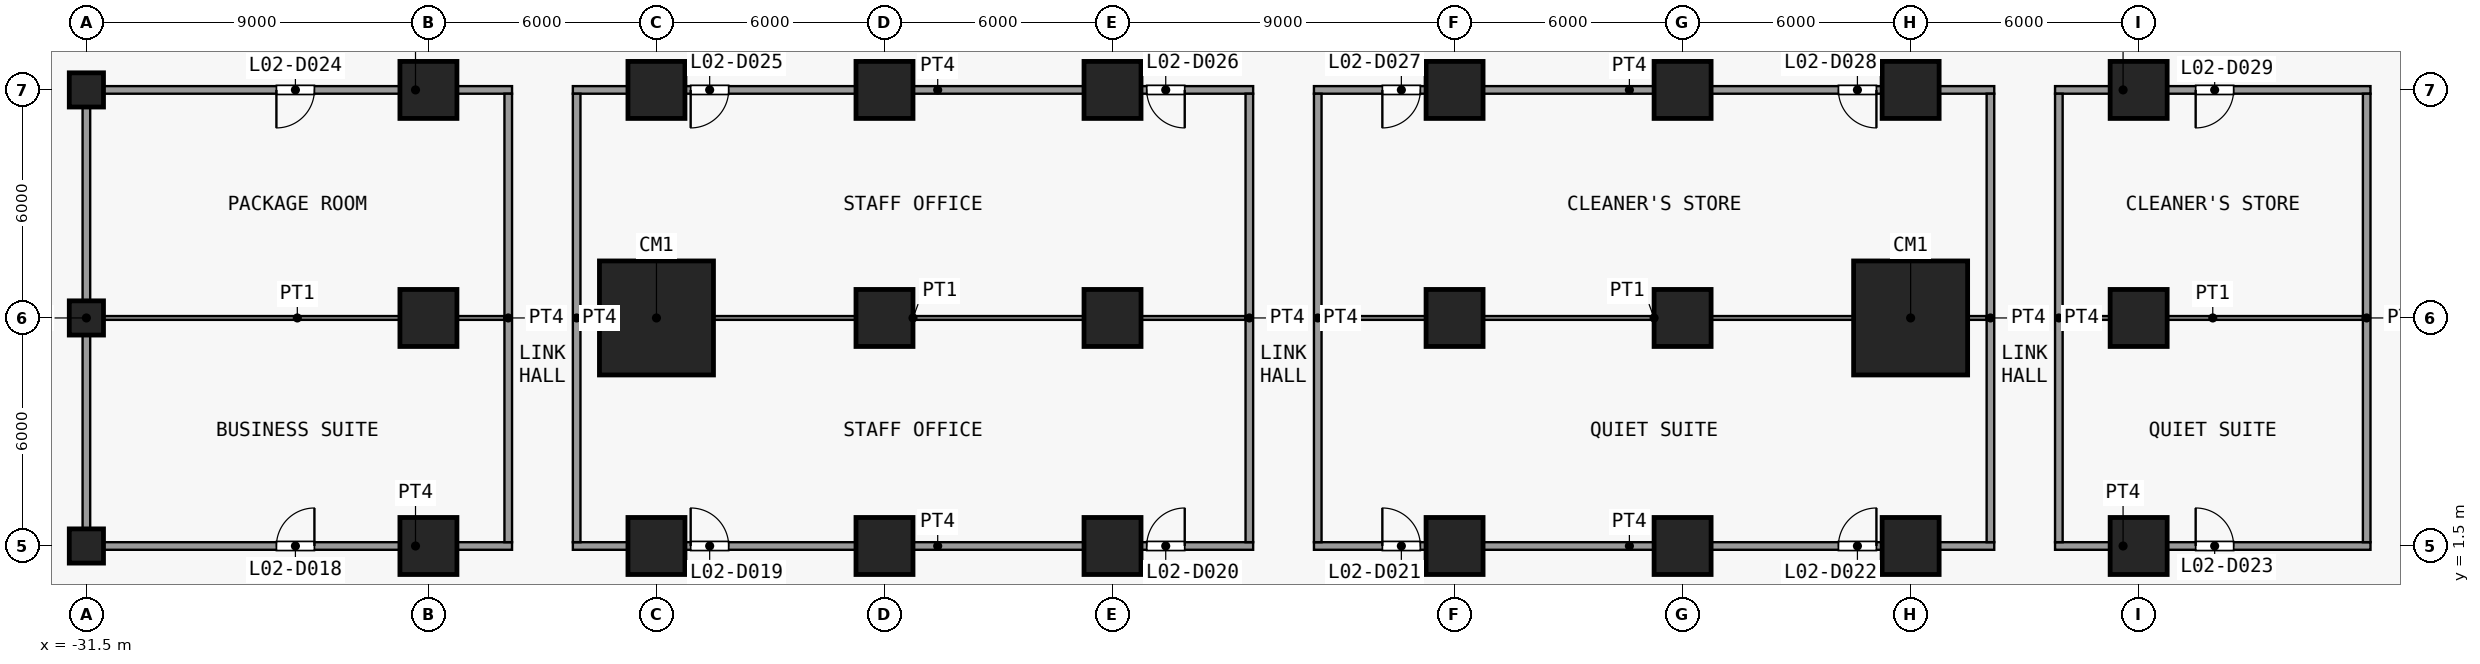
"""IFC4 building model, lengths in metres.
Left out: names, types, materials, properties, quantities, classifications, styles, units other than length and angle.
Written with IfcOpenShell. Run it as: python <this file> out.ifc"""

import sys

from ifc_helpers import new_model, si_unit, direction, frame, frame_2d, origin, origin_2d, place, context, subcontext, project, spatial, rectangle, extrude, element, fill, save


model = new_model("IFC4")
c1 = context("Model", 3, precision=1e-05, world=origin(), true_north=direction((0.0, 1.0)))
c2 = subcontext(c1, "Body", "Model", "MODEL_VIEW")
j1 = project(units=[si_unit("LENGTHUNIT", "METRE"), si_unit("PLANEANGLEUNIT", "RADIAN")], contexts=[c1])
p1 = place(None, origin())
s1 = spatial("IfcSite", under=j1, at=p1, CompositionType="ELEMENT")
p2 = place(p1, origin())
s2 = spatial("IfcBuilding", under=s1, at=p2, CompositionType="ELEMENT")
p3 = place(p2, frame((0.0, 0.0, 13.5)))
s3 = spatial("IfcBuildingStorey", under=s2, at=p3, CompositionType="ELEMENT", Elevation=13.5)
for number, where, z_axis, x_axis in (
    (1, (-31.5, 1.5, 0.0), (0.0, 0.0, 1.0), (1.0, 0.0, 0.0)),
    (2, (-31.5, 7.5, 0.0), (0.0, 0.0, 1.0), (1.0, 0.0, 0.0)),
    (3, (-31.5, 13.5, 0.0), (0.0, 0.0, 1.0), (1.0, 0.0, 0.0)),
):
    element("IfcColumn", number, at=place(p3, frame(where, z_axis=z_axis, x_axis=x_axis)), inside=s3, PredefinedType="COLUMN", context=c2, shape_type="SweptSolid", body=[
        extrude(rectangle(XDim=0.9, YDim=0.9, at=origin_2d()), origin(), (0.0, 0.0, 1.0), 5.0),
    ])
for number, where, z_axis, x_axis in (
    (4, (-22.5, 1.5, 0.0), (0.0, 0.0, 1.0), (1.0, 0.0, 0.0)),
    (5, (-22.5, 7.5, 0.0), (0.0, 0.0, 1.0), (1.0, 0.0, 0.0)),
    (6, (-22.5, 13.5, 0.0), (0.0, 0.0, 1.0), (1.0, 0.0, 0.0)),
    (7, (-16.5, 1.5, 0.0), (0.0, 0.0, 1.0), (1.0, 0.0, 0.0)),
):
    element("IfcColumn", number, at=place(p3, frame(where, z_axis=z_axis, x_axis=x_axis)), inside=s3, PredefinedType="COLUMN", context=c2, shape_type="SweptSolid", body=[
        extrude(rectangle(XDim=1.5, YDim=1.5, at=origin_2d()), origin(), (0.0, 0.0, 1.0), 5.0),
    ])
p4 = place(p3, frame((-16.5, 7.5, 0.0), z_axis=(0.0, 0.0, 1.0), x_axis=(1.0, 0.0, 0.0)))
e8 = element("IfcColumn", 8, at=p4, inside=s3, PredefinedType="COLUMN", context=c2, shape_type="SweptSolid", body=[
    extrude(rectangle(XDim=3.0, YDim=3.0, at=origin_2d()), origin(), (0.0, 0.0, 1.0), 5.0),
])
for number, where, z_axis, x_axis in (
    (9, (-16.5, 13.5, 0.0), (0.0, 0.0, 1.0), (1.0, 0.0, 0.0)),
    (10, (-10.5, 1.5, 0.0), (0.0, 0.0, 1.0), (1.0, 0.0, 0.0)),
    (11, (-10.5, 7.5, 0.0), (0.0, 0.0, 1.0), (1.0, 0.0, 0.0)),
    (12, (-10.5, 13.5, 0.0), (0.0, 0.0, 1.0), (1.0, 0.0, 0.0)),
    (13, (-4.5, 1.5, 0.0), (0.0, 0.0, 1.0), (1.0, 0.0, 0.0)),
    (14, (-4.5, 7.5, 0.0), (0.0, 0.0, 1.0), (1.0, 0.0, 0.0)),
    (15, (-4.5, 13.5, 0.0), (0.0, 0.0, 1.0), (1.0, 0.0, 0.0)),
    (16, (4.5, 1.5, 0.0), (0.0, 0.0, 1.0), (1.0, 0.0, 0.0)),
    (17, (4.5, 7.5, 0.0), (0.0, 0.0, 1.0), (1.0, 0.0, 0.0)),
    (18, (4.5, 13.5, 0.0), (0.0, 0.0, 1.0), (1.0, 0.0, 0.0)),
    (19, (10.5, 1.5, 0.0), (0.0, 0.0, 1.0), (1.0, 0.0, 0.0)),
    (20, (10.5, 7.5, 0.0), (0.0, 0.0, 1.0), (1.0, 0.0, 0.0)),
    (21, (10.5, 13.5, 0.0), (0.0, 0.0, 1.0), (1.0, 0.0, 0.0)),
    (22, (16.5, 1.5, 0.0), (0.0, 0.0, 1.0), (1.0, 0.0, 0.0)),
):
    element("IfcColumn", number, at=place(p3, frame(where, z_axis=z_axis, x_axis=x_axis)), inside=s3, PredefinedType="COLUMN", context=c2, shape_type="SweptSolid", body=[
        extrude(rectangle(XDim=1.5, YDim=1.5, at=origin_2d()), origin(), (0.0, 0.0, 1.0), 5.0),
    ])
p5 = place(p3, frame((16.5, 7.5, 0.0), z_axis=(0.0, 0.0, 1.0), x_axis=(1.0, 0.0, 0.0)))
e23 = element("IfcColumn", 23, at=p5, inside=s3, PredefinedType="COLUMN", context=c2, shape_type="SweptSolid", body=[
    extrude(rectangle(XDim=3.0, YDim=3.0, at=origin_2d()), origin(), (0.0, 0.0, 1.0), 5.0),
])
for number, where, z_axis, x_axis in (
    (24, (16.5, 13.5, 0.0), (0.0, 0.0, 1.0), (1.0, 0.0, 0.0)),
    (25, (22.5, 1.5, 0.0), (0.0, 0.0, 1.0), (1.0, 0.0, 0.0)),
    (26, (22.5, 7.5, 0.0), (0.0, 0.0, 1.0), (1.0, 0.0, 0.0)),
    (27, (22.5, 13.5, 0.0), (0.0, 0.0, 1.0), (1.0, 0.0, 0.0)),
):
    element("IfcColumn", number, at=place(p3, frame(where, z_axis=z_axis, x_axis=x_axis)), inside=s3, PredefinedType="COLUMN", context=c2, shape_type="SweptSolid", body=[
        extrude(rectangle(XDim=1.5, YDim=1.5, at=origin_2d()), origin(), (0.0, 0.0, 1.0), 5.0),
    ])
p6 = place(p3, frame((-31.6, 1.5, 0.0), z_axis=(0.0, 0.0, 1.0), x_axis=(1.0, 0.0, 0.0)))
e28 = element("IfcWall", 28, at=p6, inside=s3, PredefinedType="PARTITIONING", context=c2, shape_type="SweptSolid", body=[
    extrude(rectangle(XDim=11.3, YDim=0.2, at=frame_2d((5.65, 0.0))), origin(), (0.0, 0.0, 1.0), 4.65),
])
p7 = place(p6, frame((5.1, 0.0, 0.0)))
e29 = element("IfcOpeningElement", 29, at=p7, cuts=e28, PredefinedType="OPENING", context=c2, shape_type="SweptSolid", body=[
    extrude(rectangle(XDim=1.0, YDim=2.1, at=frame_2d((0.5, 1.05))), frame((0.0, 0.11, 0.0), z_axis=(0.0, -1.0, 0.0), x_axis=(1.0, 0.0, 0.0)), (0.0, 0.0, 1.0), 0.22),
])
p8 = place(p3, frame((-18.7, 1.5, 0.0), z_axis=(0.0, 0.0, 1.0), x_axis=(1.0, 0.0, 0.0)))
e30 = element("IfcWall", 30, at=p8, inside=s3, PredefinedType="PARTITIONING", context=c2, shape_type="SweptSolid", body=[
    extrude(rectangle(XDim=17.9, YDim=0.2, at=frame_2d((8.95, 0.0))), origin(), (0.0, 0.0, 1.0), 4.65),
])
p9 = place(p8, frame((3.1, 0.0, 0.0)))
e31 = element("IfcOpeningElement", 31, at=p9, cuts=e30, PredefinedType="OPENING", context=c2, shape_type="SweptSolid", body=[
    extrude(rectangle(XDim=1.0, YDim=2.1, at=frame_2d((0.5, 1.05))), frame((0.0, 0.11, 0.0), z_axis=(0.0, -1.0, 0.0), x_axis=(1.0, 0.0, 0.0)), (0.0, 0.0, 1.0), 0.22),
])
p10 = place(p8, frame((15.1, 0.0, 0.0)))
e32 = element("IfcOpeningElement", 32, at=p10, cuts=e30, PredefinedType="OPENING", context=c2, shape_type="SweptSolid", body=[
    extrude(rectangle(XDim=1.0, YDim=2.1, at=frame_2d((0.5, 1.05))), frame((0.0, 0.11, 0.0), z_axis=(0.0, -1.0, 0.0), x_axis=(1.0, 0.0, 0.0)), (0.0, 0.0, 1.0), 0.22),
])
p11 = place(p3, frame((0.8, 1.5, 0.0), z_axis=(0.0, 0.0, 1.0), x_axis=(1.0, 0.0, 0.0)))
e33 = element("IfcWall", 33, at=p11, inside=s3, PredefinedType="PARTITIONING", context=c2, shape_type="SweptSolid", body=[
    extrude(rectangle(XDim=17.9, YDim=0.2, at=frame_2d((8.95, 0.0))), origin(), (0.0, 0.0, 1.0), 4.65),
])
p12 = place(p11, frame((1.8, 0.0, 0.0)))
e34 = element("IfcOpeningElement", 34, at=p12, cuts=e33, PredefinedType="OPENING", context=c2, shape_type="SweptSolid", body=[
    extrude(rectangle(XDim=1.0, YDim=2.1, at=frame_2d((0.5, 1.05))), frame((0.0, 0.11, 0.0), z_axis=(0.0, -1.0, 0.0), x_axis=(1.0, 0.0, 0.0)), (0.0, 0.0, 1.0), 0.22),
])
p13 = place(p11, frame((13.8, 0.0, 0.0)))
e35 = element("IfcOpeningElement", 35, at=p13, cuts=e33, PredefinedType="OPENING", context=c2, shape_type="SweptSolid", body=[
    extrude(rectangle(XDim=1.0, YDim=2.1, at=frame_2d((0.5, 1.05))), frame((0.0, 0.11, 0.0), z_axis=(0.0, -1.0, 0.0), x_axis=(1.0, 0.0, 0.0)), (0.0, 0.0, 1.0), 0.22),
])
p14 = place(p3, frame((20.3, 1.5, 0.0), z_axis=(0.0, 0.0, 1.0), x_axis=(1.0, 0.0, 0.0)))
e36 = element("IfcWall", 36, at=p14, inside=s3, PredefinedType="PARTITIONING", context=c2, shape_type="SweptSolid", body=[
    extrude(rectangle(XDim=8.3, YDim=0.2, at=frame_2d((4.15, 0.0))), origin(), (0.0, 0.0, 1.0), 4.65),
])
p15 = place(p14, frame((3.7, 0.0, 0.0)))
e37 = element("IfcOpeningElement", 37, at=p15, cuts=e36, PredefinedType="OPENING", context=c2, shape_type="SweptSolid", body=[
    extrude(rectangle(XDim=1.0, YDim=2.1, at=frame_2d((0.5, 1.05))), frame((0.0, 0.11, 0.0), z_axis=(0.0, -1.0, 0.0), x_axis=(1.0, 0.0, 0.0)), (0.0, 0.0, 1.0), 0.22),
])
p16 = place(p3, frame((-31.4, 7.5, 0.0), z_axis=(0.0, 0.0, 1.0), x_axis=(1.0, 0.0, 0.0)))
e38 = element("IfcWall", 38, at=p16, inside=s3, PredefinedType="PARTITIONING", context=c2, shape_type="SweptSolid", body=[
    extrude(rectangle(XDim=10.9, YDim=0.1, at=frame_2d((5.45, 0.0))), origin(), (0.0, 0.0, 1.0), 4.65),
])
for number, where, z_axis, x_axis in (
    (39, (-18.5, 7.5, 0.0), (0.0, 0.0, 1.0), (1.0, 0.0, 0.0)),
    (40, (1.0, 7.5, 0.0), (0.0, 0.0, 1.0), (1.0, 0.0, 0.0)),
):
    element("IfcWall", number, at=place(p3, frame(where, z_axis=z_axis, x_axis=x_axis)), inside=s3, PredefinedType="PARTITIONING", context=c2, shape_type="SweptSolid", body=[
        extrude(rectangle(XDim=17.5, YDim=0.1, at=frame_2d((8.75, 0.0))), origin(), (0.0, 0.0, 1.0), 4.65),
    ])
p17 = place(p3, frame((20.5, 7.5, 0.0), z_axis=(0.0, 0.0, 1.0), x_axis=(1.0, 0.0, 0.0)))
e41 = element("IfcWall", 41, at=p17, inside=s3, PredefinedType="PARTITIONING", context=c2, shape_type="SweptSolid", body=[
    extrude(rectangle(XDim=7.9, YDim=0.1, at=frame_2d((3.95, 0.0))), origin(), (0.0, 0.0, 1.0), 4.65),
])
p18 = place(p3, frame((-31.6, 13.5, 0.0), z_axis=(0.0, 0.0, 1.0), x_axis=(1.0, 0.0, 0.0)))
e42 = element("IfcWall", 42, at=p18, inside=s3, PredefinedType="PARTITIONING", context=c2, shape_type="SweptSolid", body=[
    extrude(rectangle(XDim=11.3, YDim=0.2, at=frame_2d((5.65, 0.0))), origin(), (0.0, 0.0, 1.0), 4.65),
])
p19 = place(p18, frame((5.1, 0.0, 0.0)))
e43 = element("IfcOpeningElement", 43, at=p19, cuts=e42, PredefinedType="OPENING", context=c2, shape_type="SweptSolid", body=[
    extrude(rectangle(XDim=1.0, YDim=2.1, at=frame_2d((0.5, 1.05))), frame((0.0, 0.11, 0.0), z_axis=(0.0, -1.0, 0.0), x_axis=(1.0, 0.0, 0.0)), (0.0, 0.0, 1.0), 0.22),
])
p20 = place(p3, frame((-18.7, 13.5, 0.0), z_axis=(0.0, 0.0, 1.0), x_axis=(1.0, 0.0, 0.0)))
e44 = element("IfcWall", 44, at=p20, inside=s3, PredefinedType="PARTITIONING", context=c2, shape_type="SweptSolid", body=[
    extrude(rectangle(XDim=17.9, YDim=0.2, at=frame_2d((8.95, 0.0))), origin(), (0.0, 0.0, 1.0), 4.65),
])
p21 = place(p20, frame((3.1, 0.0, 0.0)))
e45 = element("IfcOpeningElement", 45, at=p21, cuts=e44, PredefinedType="OPENING", context=c2, shape_type="SweptSolid", body=[
    extrude(rectangle(XDim=1.0, YDim=2.1, at=frame_2d((0.5, 1.05))), frame((0.0, 0.11, 0.0), z_axis=(0.0, -1.0, 0.0), x_axis=(1.0, 0.0, 0.0)), (0.0, 0.0, 1.0), 0.22),
])
p22 = place(p20, frame((15.1, 0.0, 0.0)))
e46 = element("IfcOpeningElement", 46, at=p22, cuts=e44, PredefinedType="OPENING", context=c2, shape_type="SweptSolid", body=[
    extrude(rectangle(XDim=1.0, YDim=2.1, at=frame_2d((0.5, 1.05))), frame((0.0, 0.11, 0.0), z_axis=(0.0, -1.0, 0.0), x_axis=(1.0, 0.0, 0.0)), (0.0, 0.0, 1.0), 0.22),
])
p23 = place(p3, frame((0.8, 13.5, 0.0), z_axis=(0.0, 0.0, 1.0), x_axis=(1.0, 0.0, 0.0)))
e47 = element("IfcWall", 47, at=p23, inside=s3, PredefinedType="PARTITIONING", context=c2, shape_type="SweptSolid", body=[
    extrude(rectangle(XDim=17.9, YDim=0.2, at=frame_2d((8.95, 0.0))), origin(), (0.0, 0.0, 1.0), 4.65),
])
p24 = place(p23, frame((1.8, 0.0, 0.0)))
e48 = element("IfcOpeningElement", 48, at=p24, cuts=e47, PredefinedType="OPENING", context=c2, shape_type="SweptSolid", body=[
    extrude(rectangle(XDim=1.0, YDim=2.1, at=frame_2d((0.5, 1.05))), frame((0.0, 0.11, 0.0), z_axis=(0.0, -1.0, 0.0), x_axis=(1.0, 0.0, 0.0)), (0.0, 0.0, 1.0), 0.22),
])
p25 = place(p23, frame((13.8, 0.0, 0.0)))
e49 = element("IfcOpeningElement", 49, at=p25, cuts=e47, PredefinedType="OPENING", context=c2, shape_type="SweptSolid", body=[
    extrude(rectangle(XDim=1.0, YDim=2.1, at=frame_2d((0.5, 1.05))), frame((0.0, 0.11, 0.0), z_axis=(0.0, -1.0, 0.0), x_axis=(1.0, 0.0, 0.0)), (0.0, 0.0, 1.0), 0.22),
])
p26 = place(p3, frame((20.3, 13.5, 0.0), z_axis=(0.0, 0.0, 1.0), x_axis=(1.0, 0.0, 0.0)))
e50 = element("IfcWall", 50, at=p26, inside=s3, PredefinedType="PARTITIONING", context=c2, shape_type="SweptSolid", body=[
    extrude(rectangle(XDim=8.3, YDim=0.2, at=frame_2d((4.15, 0.0))), origin(), (0.0, 0.0, 1.0), 4.65),
])
p27 = place(p26, frame((3.7, 0.0, 0.0)))
e51 = element("IfcOpeningElement", 51, at=p27, cuts=e50, PredefinedType="OPENING", context=c2, shape_type="SweptSolid", body=[
    extrude(rectangle(XDim=1.0, YDim=2.1, at=frame_2d((0.5, 1.05))), frame((0.0, 0.11, 0.0), z_axis=(0.0, -1.0, 0.0), x_axis=(1.0, 0.0, 0.0)), (0.0, 0.0, 1.0), 0.22),
])
for number, where, z_axis, x_axis in (
    (52, (-31.5, 1.6, 0.0), (0.0, 0.0, 1.0), (0.0, 1.0, 0.0)),
    (53, (-20.4, 1.6, 0.0), (0.0, 0.0, 1.0), (0.0, 1.0, 0.0)),
    (54, (-18.6, 1.6, 0.0), (0.0, 0.0, 1.0), (0.0, 1.0, 0.0)),
    (55, (-0.9, 1.6, 0.0), (0.0, 0.0, 1.0), (0.0, 1.0, 0.0)),
    (56, (0.9, 1.6, 0.0), (0.0, 0.0, 1.0), (0.0, 1.0, 0.0)),
    (57, (18.6, 1.6, 0.0), (0.0, 0.0, 1.0), (0.0, 1.0, 0.0)),
    (58, (20.4, 1.6, 0.0), (0.0, 0.0, 1.0), (0.0, 1.0, 0.0)),
    (59, (28.5, 1.6, 0.0), (0.0, 0.0, 1.0), (0.0, 1.0, 0.0)),
):
    element("IfcWall", number, at=place(p3, frame(where, z_axis=z_axis, x_axis=x_axis)), inside=s3, PredefinedType="PARTITIONING", context=c2, shape_type="SweptSolid", body=[
        extrude(rectangle(XDim=11.8, YDim=0.2, at=frame_2d((5.9, 0.0))), origin(), (0.0, 0.0, 1.0), 4.65),
    ])
p28 = place(p7, origin())
e60 = element("IfcDoor", 60, at=p28, inside=s3, OperationType="SINGLE_SWING_LEFT", PredefinedType="DOOR", context=c2, shape_type="SweptSolid", body=[
    extrude(rectangle(XDim=1.0, YDim=2.1, at=frame_2d((0.5, 1.05))), frame((0.0, 0.025, 0.0), z_axis=(0.0, -1.0, 0.0), x_axis=(1.0, 0.0, 0.0)), (0.0, 0.0, 1.0), 0.05),
])
fill(e29, e60)
p29 = place(p9, origin())
e61 = element("IfcDoor", 61, at=p29, inside=s3, OperationType="SINGLE_SWING_RIGHT", PredefinedType="DOOR", context=c2, shape_type="SweptSolid", body=[
    extrude(rectangle(XDim=1.0, YDim=2.1, at=frame_2d((0.5, 1.05))), frame((0.0, 0.025, 0.0), z_axis=(0.0, -1.0, 0.0), x_axis=(1.0, 0.0, 0.0)), (0.0, 0.0, 1.0), 0.05),
])
fill(e31, e61)
p30 = place(p10, origin())
e62 = element("IfcDoor", 62, at=p30, inside=s3, OperationType="SINGLE_SWING_LEFT", PredefinedType="DOOR", context=c2, shape_type="SweptSolid", body=[
    extrude(rectangle(XDim=1.0, YDim=2.1, at=frame_2d((0.5, 1.05))), frame((0.0, 0.025, 0.0), z_axis=(0.0, -1.0, 0.0), x_axis=(1.0, 0.0, 0.0)), (0.0, 0.0, 1.0), 0.05),
])
fill(e32, e62)
p31 = place(p12, origin())
e63 = element("IfcDoor", 63, at=p31, inside=s3, OperationType="SINGLE_SWING_RIGHT", PredefinedType="DOOR", context=c2, shape_type="SweptSolid", body=[
    extrude(rectangle(XDim=1.0, YDim=2.1, at=frame_2d((0.5, 1.05))), frame((0.0, 0.025, 0.0), z_axis=(0.0, -1.0, 0.0), x_axis=(1.0, 0.0, 0.0)), (0.0, 0.0, 1.0), 0.05),
])
fill(e34, e63)
p32 = place(p13, origin())
e64 = element("IfcDoor", 64, at=p32, inside=s3, OperationType="SINGLE_SWING_LEFT", PredefinedType="DOOR", context=c2, shape_type="SweptSolid", body=[
    extrude(rectangle(XDim=1.0, YDim=2.1, at=frame_2d((0.5, 1.05))), frame((0.0, 0.025, 0.0), z_axis=(0.0, -1.0, 0.0), x_axis=(1.0, 0.0, 0.0)), (0.0, 0.0, 1.0), 0.05),
])
fill(e35, e64)
p33 = place(p15, origin())
e65 = element("IfcDoor", 65, at=p33, inside=s3, OperationType="SINGLE_SWING_RIGHT", PredefinedType="DOOR", context=c2, shape_type="SweptSolid", body=[
    extrude(rectangle(XDim=1.0, YDim=2.1, at=frame_2d((0.5, 1.05))), frame((0.0, 0.025, 0.0), z_axis=(0.0, -1.0, 0.0), x_axis=(1.0, 0.0, 0.0)), (0.0, 0.0, 1.0), 0.05),
])
fill(e37, e65)
p34 = place(p19, origin())
e66 = element("IfcDoor", 66, at=p34, inside=s3, OperationType="SINGLE_SWING_LEFT", PredefinedType="DOOR", context=c2, shape_type="SweptSolid", body=[
    extrude(rectangle(XDim=1.0, YDim=2.1, at=frame_2d((0.5, 1.05))), frame((0.0, 0.025, 0.0), z_axis=(0.0, -1.0, 0.0), x_axis=(1.0, 0.0, 0.0)), (0.0, 0.0, 1.0), 0.05),
])
fill(e43, e66)
p35 = place(p21, origin())
e67 = element("IfcDoor", 67, at=p35, inside=s3, OperationType="SINGLE_SWING_LEFT", PredefinedType="DOOR", context=c2, shape_type="SweptSolid", body=[
    extrude(rectangle(XDim=1.0, YDim=2.1, at=frame_2d((0.5, 1.05))), frame((0.0, 0.025, 0.0), z_axis=(0.0, -1.0, 0.0), x_axis=(1.0, 0.0, 0.0)), (0.0, 0.0, 1.0), 0.05),
])
fill(e45, e67)
p36 = place(p22, origin())
e68 = element("IfcDoor", 68, at=p36, inside=s3, OperationType="SINGLE_SWING_RIGHT", PredefinedType="DOOR", context=c2, shape_type="SweptSolid", body=[
    extrude(rectangle(XDim=1.0, YDim=2.1, at=frame_2d((0.5, 1.05))), frame((0.0, 0.025, 0.0), z_axis=(0.0, -1.0, 0.0), x_axis=(1.0, 0.0, 0.0)), (0.0, 0.0, 1.0), 0.05),
])
fill(e46, e68)
p37 = place(p24, origin())
e69 = element("IfcDoor", 69, at=p37, inside=s3, OperationType="SINGLE_SWING_LEFT", PredefinedType="DOOR", context=c2, shape_type="SweptSolid", body=[
    extrude(rectangle(XDim=1.0, YDim=2.1, at=frame_2d((0.5, 1.05))), frame((0.0, 0.025, 0.0), z_axis=(0.0, -1.0, 0.0), x_axis=(1.0, 0.0, 0.0)), (0.0, 0.0, 1.0), 0.05),
])
fill(e48, e69)
p38 = place(p25, origin())
e70 = element("IfcDoor", 70, at=p38, inside=s3, OperationType="SINGLE_SWING_RIGHT", PredefinedType="DOOR", context=c2, shape_type="SweptSolid", body=[
    extrude(rectangle(XDim=1.0, YDim=2.1, at=frame_2d((0.5, 1.05))), frame((0.0, 0.025, 0.0), z_axis=(0.0, -1.0, 0.0), x_axis=(1.0, 0.0, 0.0)), (0.0, 0.0, 1.0), 0.05),
])
fill(e49, e70)
p39 = place(p27, origin())
e71 = element("IfcDoor", 71, at=p39, inside=s3, OperationType="SINGLE_SWING_LEFT", PredefinedType="DOOR", context=c2, shape_type="SweptSolid", body=[
    extrude(rectangle(XDim=1.0, YDim=2.1, at=frame_2d((0.5, 1.05))), frame((0.0, 0.025, 0.0), z_axis=(0.0, -1.0, 0.0), x_axis=(1.0, 0.0, 0.0)), (0.0, 0.0, 1.0), 0.05),
])
fill(e51, e71)
save(model, sys.argv[1])
